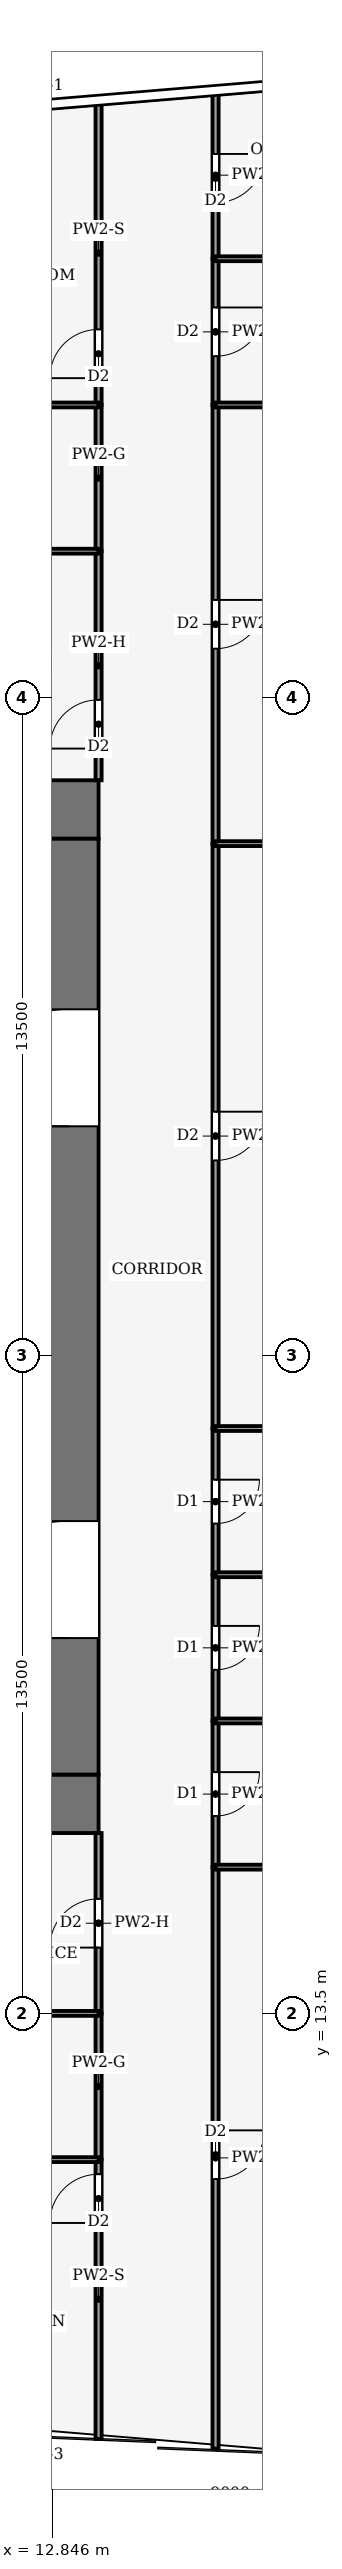
"""IFC4 building model, lengths in metres.
Left out: names, types, materials, properties, quantities, classifications, styles, units other than length and angle.
Written with IfcOpenShell. Run it as: python <this file> out.ifc"""

import sys

from ifc_helpers import new_model, si_unit, direction, frame, frame_2d, origin, place, context, subcontext, project, spatial, rectangle, extrude, element, fill, save


model = new_model("IFC4")
c1 = context("Model", 3, precision=1e-05, world=origin(), true_north=direction((0.0, 1.0)))
c2 = subcontext(c1, "Body", "Model", "MODEL_VIEW")
j1 = project(units=[si_unit("LENGTHUNIT", "METRE"), si_unit("PLANEANGLEUNIT", "RADIAN")], contexts=[c1])
p1 = place(None, origin())
s1 = spatial("IfcSite", under=j1, at=p1, CompositionType="ELEMENT")
p2 = place(p1, origin())
s2 = spatial("IfcBuilding", under=s1, at=p2, CompositionType="ELEMENT")
p3 = place(p2, frame((0.0, 0.0, 70.0)))
s3 = spatial("IfcBuildingStorey", under=s2, at=p3, CompositionType="ELEMENT", Elevation=70.0)
for number, where, z_axis, x_axis in (
    (1, (-13.8, 17.8, -0.13), (0.0, 0.0, 1.0), (1.0, 0.0, 0.0)),
    (2, (-13.8, 38.2, -0.13), (0.0, 0.0, 1.0), (1.0, 0.0, 0.0)),
):
    element("IfcWall", number, at=place(p3, frame(where, z_axis=z_axis, x_axis=x_axis)), inside=s3, PredefinedType="SHEAR", context=c2, shape_type="SweptSolid", body=[
        extrude(rectangle(XDim=27.6, YDim=1.2, at=frame_2d((13.8, 0.0))), origin(), (0.0, 0.0, 1.0), 4.0),
    ])
p4 = place(p3, frame((13.2, 18.4, -0.13), z_axis=(0.0, 0.0, 1.0), x_axis=(0.0, 1.0, 0.0)))
e3 = element("IfcWall", 3, at=p4, inside=s3, PredefinedType="SHEAR", context=c2, shape_type="SweptSolid", body=[
    extrude(rectangle(XDim=19.2, YDim=1.2, at=frame_2d((9.6, 0.0))), origin(), (0.0, 0.0, 1.0), 4.0),
])
p5 = place(p4, frame((2.8, 0.0, 0.13)))
e4 = element("IfcOpeningElement", 4, at=p5, cuts=e3, PredefinedType="OPENING", context=c2, shape_type="SweptSolid", body=[
    extrude(rectangle(XDim=2.4, YDim=2.4, at=frame_2d((1.2, 1.2))), frame((0.0, 0.61, 0.0), z_axis=(0.0, -1.0, 0.0), x_axis=(1.0, 0.0, 0.0)), (0.0, 0.0, 1.0), 1.22),
])
p6 = place(p4, frame((13.3, 0.0, 0.13)))
e5 = element("IfcOpeningElement", 5, at=p6, cuts=e3, PredefinedType="OPENING", context=c2, shape_type="SweptSolid", body=[
    extrude(rectangle(XDim=2.4, YDim=2.4, at=frame_2d((1.2, 1.2))), frame((0.0, 0.61, 0.0), z_axis=(0.0, -1.0, 0.0), x_axis=(1.0, 0.0, 0.0)), (0.0, 0.0, 1.0), 1.22),
])
p7 = place(p3, frame((16.2, 16.5, 0.0), z_axis=(0.0, 0.0, 1.0), x_axis=(0.0, -1.0, 0.0)))
e6 = element("IfcWall", 6, at=p7, inside=s3, PredefinedType="PARTITIONING", context=c2, shape_type="SweptSolid", body=[
    extrude(rectangle(XDim=11.93, YDim=0.125, at=frame_2d((5.965, 0.0))), origin(), (0.0, 0.0, 1.0), 3.04),
])
p8 = place(p7, frame((5.4, 0.0, 0.0)))
e7 = element("IfcOpeningElement", 7, at=p8, cuts=e6, PredefinedType="OPENING", context=c2, shape_type="SweptSolid", body=[
    extrude(rectangle(XDim=1.0, YDim=2.1, at=frame_2d((0.5, 1.05))), frame((0.0, 0.073, 0.0), z_axis=(0.0, -1.0, 0.0), x_axis=(1.0, 0.0, 0.0)), (0.0, 0.0, 1.0), 0.145),
])
p9 = place(p3, frame((16.2, 19.5, 0.0), z_axis=(0.0, 0.0, 1.0), x_axis=(0.0, -1.0, 0.0)))
e8 = element("IfcWall", 8, at=p9, inside=s3, PredefinedType="PARTITIONING", context=c2, shape_type="SweptSolid", body=[
    extrude(rectangle(XDim=3.0, YDim=0.125, at=frame_2d((1.5, 0.0))), origin(), (0.0, 0.0, 1.0), 3.14),
])
p10 = place(p9, frame((1.05, 0.0, 0.0)))
e9 = element("IfcOpeningElement", 9, at=p10, cuts=e8, PredefinedType="OPENING", context=c2, shape_type="SweptSolid", body=[
    extrude(rectangle(XDim=0.9, YDim=2.1, at=frame_2d((0.45, 1.05))), frame((0.0, 0.073, 0.0), z_axis=(0.0, -1.0, 0.0), x_axis=(1.0, 0.0, 0.0)), (0.0, 0.0, 1.0), 0.145),
])
p11 = place(p3, frame((16.2, 22.5, 0.0), z_axis=(0.0, 0.0, 1.0), x_axis=(0.0, -1.0, 0.0)))
e10 = element("IfcWall", 10, at=p11, inside=s3, PredefinedType="PARTITIONING", context=c2, shape_type="SweptSolid", body=[
    extrude(rectangle(XDim=3.0, YDim=0.125, at=frame_2d((1.5, 0.0))), origin(), (0.0, 0.0, 1.0), 3.87),
])
p12 = place(p11, frame((1.05, 0.0, 0.0)))
e11 = element("IfcOpeningElement", 11, at=p12, cuts=e10, PredefinedType="OPENING", context=c2, shape_type="SweptSolid", body=[
    extrude(rectangle(XDim=0.9, YDim=2.1, at=frame_2d((0.45, 1.05))), frame((0.0, 0.073, 0.0), z_axis=(0.0, -1.0, 0.0), x_axis=(1.0, 0.0, 0.0)), (0.0, 0.0, 1.0), 0.145),
])
p13 = place(p3, frame((16.2, 25.5, 0.0), z_axis=(0.0, 0.0, 1.0), x_axis=(0.0, -1.0, 0.0)))
e12 = element("IfcWall", 12, at=p13, inside=s3, PredefinedType="PARTITIONING", context=c2, shape_type="SweptSolid", body=[
    extrude(rectangle(XDim=3.0, YDim=0.125, at=frame_2d((1.5, 0.0))), origin(), (0.0, 0.0, 1.0), 3.48),
])
p14 = place(p13, frame((1.05, 0.0, 0.0)))
e13 = element("IfcOpeningElement", 13, at=p14, cuts=e12, PredefinedType="OPENING", context=c2, shape_type="SweptSolid", body=[
    extrude(rectangle(XDim=0.9, YDim=2.1, at=frame_2d((0.45, 1.05))), frame((0.0, 0.073, 0.0), z_axis=(0.0, -1.0, 0.0), x_axis=(1.0, 0.0, 0.0)), (0.0, 0.0, 1.0), 0.145),
])
p15 = place(p3, frame((16.2, 37.5, 0.0), z_axis=(0.0, 0.0, 1.0), x_axis=(0.0, -1.0, 0.0)))
e14 = element("IfcWall", 14, at=p15, inside=s3, PredefinedType="PARTITIONING", context=c2, shape_type="SweptSolid", body=[
    extrude(rectangle(XDim=12.0, YDim=0.125, at=frame_2d((6.0, 0.0))), origin(), (0.0, 0.0, 1.0), 3.48),
])
p16 = place(p15, frame((5.5, 0.0, 0.0)))
e15 = element("IfcOpeningElement", 15, at=p16, cuts=e14, PredefinedType="OPENING", context=c2, shape_type="SweptSolid", body=[
    extrude(rectangle(XDim=1.0, YDim=2.1, at=frame_2d((0.5, 1.05))), frame((0.0, 0.073, 0.0), z_axis=(0.0, -1.0, 0.0), x_axis=(1.0, 0.0, 0.0)), (0.0, 0.0, 1.0), 0.145),
])
p17 = place(p3, frame((16.2, 46.5, 0.0), z_axis=(0.0, 0.0, 1.0), x_axis=(0.0, -1.0, 0.0)))
e16 = element("IfcWall", 16, at=p17, inside=s3, PredefinedType="PARTITIONING", context=c2, shape_type="SweptSolid", body=[
    extrude(rectangle(XDim=9.0, YDim=0.125, at=frame_2d((4.5, 0.0))), origin(), (0.0, 0.0, 1.0), 3.14),
])
p18 = place(p17, frame((4.0, 0.0, 0.0)))
e17 = element("IfcOpeningElement", 17, at=p18, cuts=e16, PredefinedType="OPENING", context=c2, shape_type="SweptSolid", body=[
    extrude(rectangle(XDim=1.0, YDim=2.1, at=frame_2d((0.5, 1.05))), frame((0.0, 0.073, 0.0), z_axis=(0.0, -1.0, 0.0), x_axis=(1.0, 0.0, 0.0)), (0.0, 0.0, 1.0), 0.145),
])
p19 = place(p3, frame((16.2, 49.5, 0.0), z_axis=(0.0, 0.0, 1.0), x_axis=(0.0, -1.0, 0.0)))
e18 = element("IfcWall", 18, at=p19, inside=s3, PredefinedType="PARTITIONING", context=c2, shape_type="SweptSolid", body=[
    extrude(rectangle(XDim=3.0, YDim=0.125, at=frame_2d((1.5, 0.0))), origin(), (0.0, 0.0, 1.0), 3.87),
])
p20 = place(p19, frame((1.0, 0.0, 0.0)))
e19 = element("IfcOpeningElement", 19, at=p20, cuts=e18, PredefinedType="OPENING", context=c2, shape_type="SweptSolid", body=[
    extrude(rectangle(XDim=1.0, YDim=2.1, at=frame_2d((0.5, 1.05))), frame((0.0, 0.073, 0.0), z_axis=(0.0, -1.0, 0.0), x_axis=(1.0, 0.0, 0.0)), (0.0, 0.0, 1.0), 0.145),
])
p21 = place(p3, frame((16.2, 52.93, 0.0), z_axis=(0.0, 0.0, 1.0), x_axis=(0.0, -1.0, 0.0)))
e20 = element("IfcWall", 20, at=p21, inside=s3, PredefinedType="PARTITIONING", context=c2, shape_type="SweptSolid", body=[
    extrude(rectangle(XDim=3.43, YDim=0.125, at=frame_2d((1.715, 0.0))), origin(), (0.0, 0.0, 1.0), 3.04),
])
p22 = place(p21, frame((1.28, 0.0, 0.0)))
e21 = element("IfcOpeningElement", 21, at=p22, cuts=e20, PredefinedType="OPENING", context=c2, shape_type="SweptSolid", body=[
    extrude(rectangle(XDim=1.0, YDim=2.1, at=frame_2d((0.5, 1.05))), frame((0.0, 0.073, 0.0), z_axis=(0.0, -1.0, 0.0), x_axis=(1.0, 0.0, 0.0)), (0.0, 0.0, 1.0), 0.145),
])
p23 = place(p3, frame((13.8, 4.77, 0.0), z_axis=(0.0, 0.0, 1.0), x_axis=(0.0, 1.0, 0.0)))
e22 = element("IfcWall", 22, at=p23, inside=s3, PredefinedType="PARTITIONING", context=c2, shape_type="SweptSolid", body=[
    extrude(rectangle(XDim=5.73, YDim=0.125, at=frame_2d((2.865, 0.0))), origin(), (0.0, 0.0, 1.0), 3.04),
])
p24 = place(p23, frame((4.43, 0.0, 0.0)))
e23 = element("IfcOpeningElement", 23, at=p24, cuts=e22, PredefinedType="OPENING", context=c2, shape_type="SweptSolid", body=[
    extrude(rectangle(XDim=1.0, YDim=2.1, at=frame_2d((0.5, 1.05))), frame((0.0, 0.073, 0.0), z_axis=(0.0, -1.0, 0.0), x_axis=(1.0, 0.0, 0.0)), (0.0, 0.0, 1.0), 0.145),
])
p25 = place(p3, frame((13.8, 13.5, 0.0), z_axis=(0.0, 0.0, 1.0), x_axis=(0.0, -1.0, 0.0)))
e24 = element("IfcWall", 24, at=p25, inside=s3, PredefinedType="PARTITIONING", context=c2, shape_type="SweptSolid", body=[
    extrude(rectangle(XDim=3.0, YDim=0.125, at=frame_2d((1.5, 0.0))), origin(), (0.0, 0.0, 1.0), 3.87),
])
p26 = place(p3, frame((13.8, 13.5, 0.0), z_axis=(0.0, 0.0, 1.0), x_axis=(0.0, 1.0, 0.0)))
e25 = element("IfcWall", 25, at=p26, inside=s3, PredefinedType="PARTITIONING", context=c2, shape_type="SweptSolid", body=[
    extrude(rectangle(XDim=3.7, YDim=0.125, at=frame_2d((1.85, 0.0))), origin(), (0.0, 0.0, 1.0), 3.14),
])
p27 = place(p26, frame((1.35, 0.0, 0.0)))
e26 = element("IfcOpeningElement", 26, at=p27, cuts=e25, PredefinedType="OPENING", context=c2, shape_type="SweptSolid", body=[
    extrude(rectangle(XDim=1.0, YDim=2.1, at=frame_2d((0.5, 1.05))), frame((0.0, 0.073, 0.0), z_axis=(0.0, -1.0, 0.0), x_axis=(1.0, 0.0, 0.0)), (0.0, 0.0, 1.0), 0.145),
])
p28 = place(p3, frame((13.8, 38.8, 0.0), z_axis=(0.0, 0.0, 1.0), x_axis=(0.0, 1.0, 0.0)))
e27 = element("IfcWall", 27, at=p28, inside=s3, PredefinedType="PARTITIONING", context=c2, shape_type="SweptSolid", body=[
    extrude(rectangle(XDim=4.7, YDim=0.125, at=frame_2d((2.35, 0.0))), origin(), (0.0, 0.0, 1.0), 3.14),
])
p29 = place(p28, frame((0.65, 0.0, 0.0)))
e28 = element("IfcOpeningElement", 28, at=p29, cuts=e27, PredefinedType="OPENING", context=c2, shape_type="SweptSolid", body=[
    extrude(rectangle(XDim=1.0, YDim=2.1, at=frame_2d((0.5, 1.05))), frame((0.0, 0.073, 0.0), z_axis=(0.0, -1.0, 0.0), x_axis=(1.0, 0.0, 0.0)), (0.0, 0.0, 1.0), 0.145),
])
p30 = place(p3, frame((13.8, 46.5, 0.0), z_axis=(0.0, 0.0, 1.0), x_axis=(0.0, -1.0, 0.0)))
e29 = element("IfcWall", 29, at=p30, inside=s3, PredefinedType="PARTITIONING", context=c2, shape_type="SweptSolid", body=[
    extrude(rectangle(XDim=3.0, YDim=0.125, at=frame_2d((1.5, 0.0))), origin(), (0.0, 0.0, 1.0), 3.87),
])
p31 = place(p3, frame((13.8, 46.5, 0.0), z_axis=(0.0, 0.0, 1.0), x_axis=(0.0, 1.0, 0.0)))
e30 = element("IfcWall", 30, at=p31, inside=s3, PredefinedType="PARTITIONING", context=c2, shape_type="SweptSolid", body=[
    extrude(rectangle(XDim=6.23, YDim=0.125, at=frame_2d((3.115, 0.0))), origin(), (0.0, 0.0, 1.0), 3.04),
])
p32 = place(p31, frame((0.55, 0.0, 0.0)))
e31 = element("IfcOpeningElement", 31, at=p32, cuts=e30, PredefinedType="OPENING", context=c2, shape_type="SweptSolid", body=[
    extrude(rectangle(XDim=1.0, YDim=2.1, at=frame_2d((0.5, 1.05))), frame((0.0, 0.073, 0.0), z_axis=(0.0, -1.0, 0.0), x_axis=(1.0, 0.0, 0.0)), (0.0, 0.0, 1.0), 0.145),
])
p33 = place(p3, frame((23.587, 16.5, 0.0), z_axis=(0.0, 0.0, 1.0), x_axis=(-1.0, 0.0, 0.0)))
e32 = element("IfcWall", 32, at=p33, inside=s3, PredefinedType="PARTITIONING", context=c2, shape_type="SweptSolid", body=[
    extrude(rectangle(XDim=7.387, YDim=0.1, at=frame_2d((3.693, 0.0))), origin(), (0.0, 0.0, 1.0), 3.04),
])
p34 = place(p3, frame((23.34, 19.5, 0.0), z_axis=(0.0, 0.0, 1.0), x_axis=(-1.0, 0.0, 0.0)))
e33 = element("IfcWall", 33, at=p34, inside=s3, PredefinedType="PARTITIONING", context=c2, shape_type="SweptSolid", body=[
    extrude(rectangle(XDim=7.14, YDim=0.1, at=frame_2d((3.57, 0.0))), origin(), (0.0, 0.0, 1.0), 3.04),
])
p35 = place(p3, frame((23.094, 22.5, 0.0), z_axis=(0.0, 0.0, 1.0), x_axis=(-1.0, 0.0, 0.0)))
e34 = element("IfcWall", 34, at=p35, inside=s3, PredefinedType="PARTITIONING", context=c2, shape_type="SweptSolid", body=[
    extrude(rectangle(XDim=6.894, YDim=0.1, at=frame_2d((3.447, 0.0))), origin(), (0.0, 0.0, 1.0), 3.04),
])
p36 = place(p3, frame((22.847, 25.5, 0.0), z_axis=(0.0, 0.0, 1.0), x_axis=(-1.0, 0.0, 0.0)))
e35 = element("IfcWall", 35, at=p36, inside=s3, PredefinedType="PARTITIONING", context=c2, shape_type="SweptSolid", body=[
    extrude(rectangle(XDim=6.647, YDim=0.1, at=frame_2d((3.324, 0.0))), origin(), (0.0, 0.0, 1.0), 3.04),
])
p37 = place(p3, frame((23.299, 37.5, 0.0), z_axis=(0.0, 0.0, 1.0), x_axis=(-1.0, 0.0, 0.0)))
e36 = element("IfcWall", 36, at=p37, inside=s3, PredefinedType="PARTITIONING", context=c2, shape_type="SweptSolid", body=[
    extrude(rectangle(XDim=7.099, YDim=0.1, at=frame_2d((3.55, 0.0))), origin(), (0.0, 0.0, 1.0), 3.04),
])
p38 = place(p3, frame((24.039, 46.5, 0.0), z_axis=(0.0, 0.0, 1.0), x_axis=(-1.0, 0.0, 0.0)))
e37 = element("IfcWall", 37, at=p38, inside=s3, PredefinedType="PARTITIONING", context=c2, shape_type="SweptSolid", body=[
    extrude(rectangle(XDim=7.839, YDim=0.1, at=frame_2d((3.919, 0.0))), origin(), (0.0, 0.0, 1.0), 3.04),
])
p39 = place(p3, frame((23.487, 49.5, 0.0), z_axis=(0.0, 0.0, 1.0), x_axis=(-1.0, 0.0, 0.0)))
e38 = element("IfcWall", 38, at=p39, inside=s3, PredefinedType="PARTITIONING", context=c2, shape_type="SweptSolid", body=[
    extrude(rectangle(XDim=7.287, YDim=0.1, at=frame_2d((3.644, 0.0))), origin(), (0.0, 0.0, 1.0), 3.34),
])
p40 = place(p3, frame((7.5, 10.5, 0.0), z_axis=(0.0, 0.0, 1.0), x_axis=(1.0, 0.0, 0.0)))
e39 = element("IfcWall", 39, at=p40, inside=s3, PredefinedType="PARTITIONING", context=c2, shape_type="SweptSolid", body=[
    extrude(rectangle(XDim=6.3, YDim=0.1, at=frame_2d((3.15, 0.0))), origin(), (0.0, 0.0, 1.0), 3.39),
])
p41 = place(p40, frame((2.65, 0.0, 0.0)))
e40 = element("IfcOpeningElement", 40, at=p41, cuts=e39, PredefinedType="OPENING", context=c2, shape_type="SweptSolid", body=[
    extrude(rectangle(XDim=1.0, YDim=2.1, at=frame_2d((0.5, 1.05))), frame((0.0, 0.06, 0.0), z_axis=(0.0, -1.0, 0.0), x_axis=(1.0, 0.0, 0.0)), (0.0, 0.0, 1.0), 0.12),
])
p42 = place(p3, frame((13.8, 13.5, 0.0), z_axis=(0.0, 0.0, 1.0), x_axis=(-1.0, 0.0, 0.0)))
e41 = element("IfcWall", 41, at=p42, inside=s3, PredefinedType="PARTITIONING", context=c2, shape_type="SweptSolid", body=[
    extrude(rectangle(XDim=6.3, YDim=0.1, at=frame_2d((3.15, 0.0))), origin(), (0.0, 0.0, 1.0), 3.39),
])
p43 = place(p3, frame((7.5, 43.5, 0.0), z_axis=(0.0, 0.0, 1.0), x_axis=(1.0, 0.0, 0.0)))
e42 = element("IfcWall", 42, at=p43, inside=s3, PredefinedType="PARTITIONING", context=c2, shape_type="SweptSolid", body=[
    extrude(rectangle(XDim=6.3, YDim=0.1, at=frame_2d((3.15, 0.0))), origin(), (0.0, 0.0, 1.0), 3.39),
])
p44 = place(p43, frame((2.65, 0.0, 0.0)))
e43 = element("IfcOpeningElement", 43, at=p44, cuts=e42, PredefinedType="OPENING", context=c2, shape_type="SweptSolid", body=[
    extrude(rectangle(XDim=1.0, YDim=2.1, at=frame_2d((0.5, 1.05))), frame((0.0, 0.06, 0.0), z_axis=(0.0, -1.0, 0.0), x_axis=(1.0, 0.0, 0.0)), (0.0, 0.0, 1.0), 0.12),
])
p45 = place(p3, frame((13.8, 46.5, 0.0), z_axis=(0.0, 0.0, 1.0), x_axis=(-1.0, 0.0, 0.0)))
e44 = element("IfcWall", 44, at=p45, inside=s3, PredefinedType="PARTITIONING", context=c2, shape_type="SweptSolid", body=[
    extrude(rectangle(XDim=6.3, YDim=0.1, at=frame_2d((3.15, 0.0))), origin(), (0.0, 0.0, 1.0), 3.39),
])
p46 = place(p5, origin())
e45 = element("IfcDoor", 45, at=p46, inside=s3, OperationType="DOUBLE_DOOR_SINGLE_SWING", PredefinedType="DOOR", context=c2, shape_type="SweptSolid", body=[
    extrude(rectangle(XDim=2.4, YDim=2.4, at=frame_2d((1.2, 1.2))), frame((0.0, 0.025, 0.0), z_axis=(0.0, -1.0, 0.0), x_axis=(1.0, 0.0, 0.0)), (0.0, 0.0, 1.0), 0.05),
])
fill(e4, e45)
p47 = place(p6, origin())
e46 = element("IfcDoor", 46, at=p47, inside=s3, OperationType="DOUBLE_DOOR_SINGLE_SWING", PredefinedType="DOOR", context=c2, shape_type="SweptSolid", body=[
    extrude(rectangle(XDim=2.4, YDim=2.4, at=frame_2d((1.2, 1.2))), frame((0.0, 0.025, 0.0), z_axis=(0.0, -1.0, 0.0), x_axis=(1.0, 0.0, 0.0)), (0.0, 0.0, 1.0), 0.05),
])
fill(e5, e46)
p48 = place(p8, origin())
e47 = element("IfcDoor", 47, at=p48, inside=s3, OperationType="SINGLE_SWING_LEFT", PredefinedType="DOOR", context=c2, shape_type="SweptSolid", body=[
    extrude(rectangle(XDim=1.0, YDim=2.1, at=frame_2d((0.5, 1.05))), frame((0.0, 0.025, 0.0), z_axis=(0.0, -1.0, 0.0), x_axis=(1.0, 0.0, 0.0)), (0.0, 0.0, 1.0), 0.05),
])
fill(e7, e47)
p49 = place(p10, origin())
e48 = element("IfcDoor", 48, at=p49, inside=s3, OperationType="SINGLE_SWING_RIGHT", PredefinedType="DOOR", context=c2, shape_type="SweptSolid", body=[
    extrude(rectangle(XDim=0.9, YDim=2.1, at=frame_2d((0.45, 1.05))), frame((0.0, 0.025, 0.0), z_axis=(0.0, -1.0, 0.0), x_axis=(1.0, 0.0, 0.0)), (0.0, 0.0, 1.0), 0.05),
])
fill(e9, e48)
p50 = place(p12, origin())
e49 = element("IfcDoor", 49, at=p50, inside=s3, OperationType="SINGLE_SWING_LEFT", PredefinedType="DOOR", context=c2, shape_type="SweptSolid", body=[
    extrude(rectangle(XDim=0.9, YDim=2.1, at=frame_2d((0.45, 1.05))), frame((0.0, 0.025, 0.0), z_axis=(0.0, -1.0, 0.0), x_axis=(1.0, 0.0, 0.0)), (0.0, 0.0, 1.0), 0.05),
])
fill(e11, e49)
p51 = place(p14, origin())
e50 = element("IfcDoor", 50, at=p51, inside=s3, OperationType="SINGLE_SWING_RIGHT", PredefinedType="DOOR", context=c2, shape_type="SweptSolid", body=[
    extrude(rectangle(XDim=0.9, YDim=2.1, at=frame_2d((0.45, 1.05))), frame((0.0, 0.025, 0.0), z_axis=(0.0, -1.0, 0.0), x_axis=(1.0, 0.0, 0.0)), (0.0, 0.0, 1.0), 0.05),
])
fill(e13, e50)
p52 = place(p16, origin())
e51 = element("IfcDoor", 51, at=p52, inside=s3, OperationType="SINGLE_SWING_LEFT", PredefinedType="DOOR", context=c2, shape_type="SweptSolid", body=[
    extrude(rectangle(XDim=1.0, YDim=2.1, at=frame_2d((0.5, 1.05))), frame((0.0, 0.025, 0.0), z_axis=(0.0, -1.0, 0.0), x_axis=(1.0, 0.0, 0.0)), (0.0, 0.0, 1.0), 0.05),
])
fill(e15, e51)
p53 = place(p18, origin())
e52 = element("IfcDoor", 52, at=p53, inside=s3, OperationType="SINGLE_SWING_RIGHT", PredefinedType="DOOR", context=c2, shape_type="SweptSolid", body=[
    extrude(rectangle(XDim=1.0, YDim=2.1, at=frame_2d((0.5, 1.05))), frame((0.0, 0.025, 0.0), z_axis=(0.0, -1.0, 0.0), x_axis=(1.0, 0.0, 0.0)), (0.0, 0.0, 1.0), 0.05),
])
fill(e17, e52)
p54 = place(p20, origin())
e53 = element("IfcDoor", 53, at=p54, inside=s3, OperationType="SINGLE_SWING_LEFT", PredefinedType="DOOR", context=c2, shape_type="SweptSolid", body=[
    extrude(rectangle(XDim=1.0, YDim=2.1, at=frame_2d((0.5, 1.05))), frame((0.0, 0.025, 0.0), z_axis=(0.0, -1.0, 0.0), x_axis=(1.0, 0.0, 0.0)), (0.0, 0.0, 1.0), 0.05),
])
fill(e19, e53)
p55 = place(p22, origin())
e54 = element("IfcDoor", 54, at=p55, inside=s3, OperationType="SINGLE_SWING_RIGHT", PredefinedType="DOOR", context=c2, shape_type="SweptSolid", body=[
    extrude(rectangle(XDim=1.0, YDim=2.1, at=frame_2d((0.5, 1.05))), frame((0.0, 0.025, 0.0), z_axis=(0.0, -1.0, 0.0), x_axis=(1.0, 0.0, 0.0)), (0.0, 0.0, 1.0), 0.05),
])
fill(e21, e54)
p56 = place(p24, origin())
e55 = element("IfcDoor", 55, at=p56, inside=s3, OperationType="SINGLE_SWING_RIGHT", PredefinedType="DOOR", context=c2, shape_type="SweptSolid", body=[
    extrude(rectangle(XDim=1.0, YDim=2.1, at=frame_2d((0.5, 1.05))), frame((0.0, 0.025, 0.0), z_axis=(0.0, -1.0, 0.0), x_axis=(1.0, 0.0, 0.0)), (0.0, 0.0, 1.0), 0.05),
])
fill(e23, e55)
p57 = place(p27, origin())
e56 = element("IfcDoor", 56, at=p57, inside=s3, OperationType="SINGLE_SWING_RIGHT", PredefinedType="DOOR", context=c2, shape_type="SweptSolid", body=[
    extrude(rectangle(XDim=1.0, YDim=2.1, at=frame_2d((0.5, 1.05))), frame((0.0, 0.025, 0.0), z_axis=(0.0, -1.0, 0.0), x_axis=(1.0, 0.0, 0.0)), (0.0, 0.0, 1.0), 0.05),
])
fill(e26, e56)
p58 = place(p29, origin())
e57 = element("IfcDoor", 57, at=p58, inside=s3, OperationType="SINGLE_SWING_LEFT", PredefinedType="DOOR", context=c2, shape_type="SweptSolid", body=[
    extrude(rectangle(XDim=1.0, YDim=2.1, at=frame_2d((0.5, 1.05))), frame((0.0, 0.025, 0.0), z_axis=(0.0, -1.0, 0.0), x_axis=(1.0, 0.0, 0.0)), (0.0, 0.0, 1.0), 0.05),
])
fill(e28, e57)
p59 = place(p32, origin())
e58 = element("IfcDoor", 58, at=p59, inside=s3, OperationType="SINGLE_SWING_LEFT", PredefinedType="DOOR", context=c2, shape_type="SweptSolid", body=[
    extrude(rectangle(XDim=1.0, YDim=2.1, at=frame_2d((0.5, 1.05))), frame((0.0, 0.025, 0.0), z_axis=(0.0, -1.0, 0.0), x_axis=(1.0, 0.0, 0.0)), (0.0, 0.0, 1.0), 0.05),
])
fill(e31, e58)
save(model, sys.argv[1])
